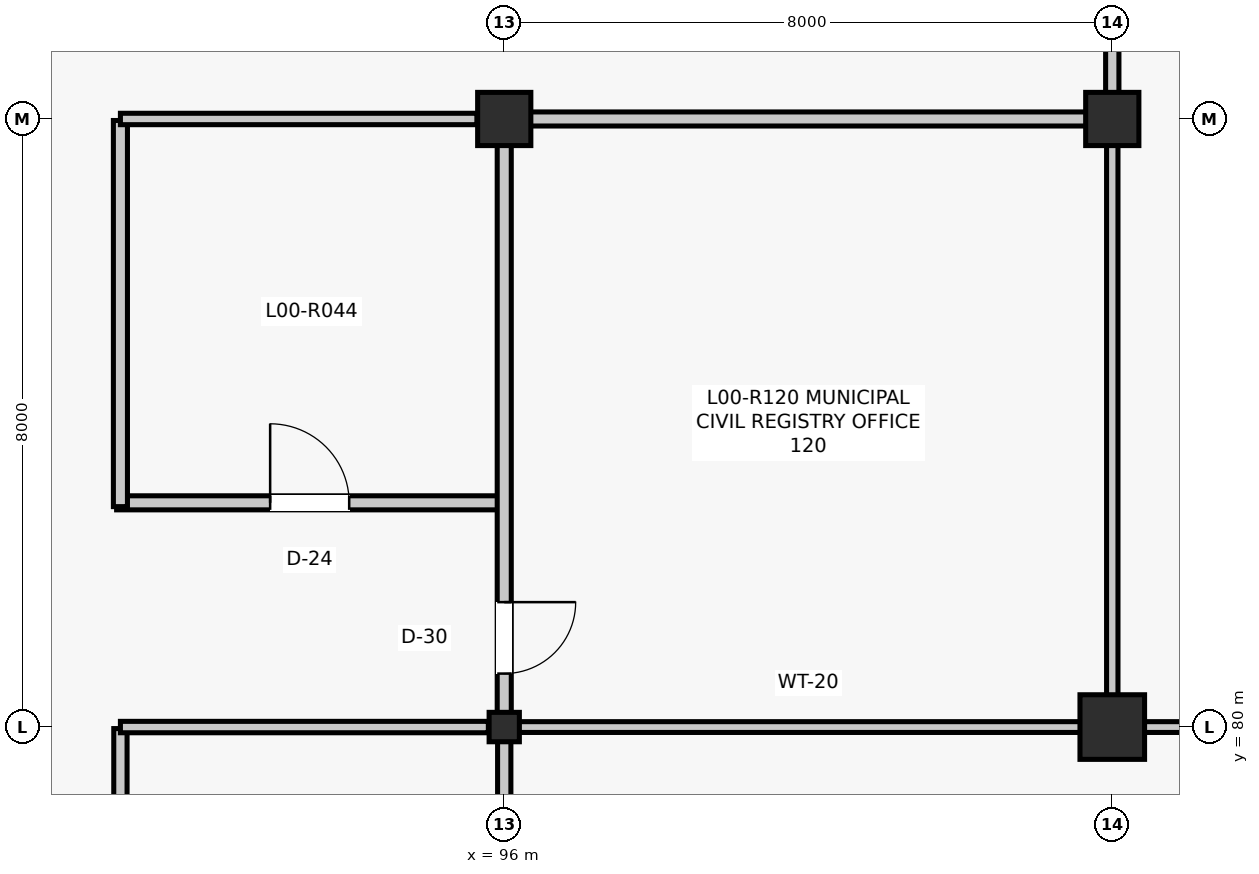
"""IFC4 building model, lengths in metres.
Left out: names, types, materials, properties, quantities, classifications, styles, units other than length and angle.
Written with IfcOpenShell. Run it as: python <this file> out.ifc"""

import sys

from ifc_helpers import new_model, si_unit, direction, frame, frame_2d, origin, origin_2d, place, context, subcontext, project, spatial, rectangle, i_section, extrude, element, fill, save


model = new_model("IFC4")
c1 = context("Model", 3, precision=1e-05, world=origin(), true_north=direction((0.0, 1.0)))
c2 = subcontext(c1, "Body", "Model", "MODEL_VIEW")
j1 = project(units=[si_unit("LENGTHUNIT", "METRE"), si_unit("PLANEANGLEUNIT", "RADIAN")], contexts=[c1])
p1 = place(None, origin())
s1 = spatial("IfcSite", under=j1, at=p1, CompositionType="ELEMENT")
p2 = place(p1, origin())
s2 = spatial("IfcBuilding", under=s1, at=p2, CompositionType="ELEMENT")
p3 = place(p2, origin())
s3 = spatial("IfcBuildingStorey", under=s2, at=p3, CompositionType="ELEMENT", Elevation=0.0)
p4 = place(p3, frame((96.0, 80.0, 0.0), z_axis=(0.0, 0.0, 1.0), x_axis=(1.0, 0.0, 0.0)))
e1 = element("IfcColumn", 1, at=p4, inside=s3, PredefinedType="COLUMN", context=c2, shape_type="SweptSolid", body=[
    extrude(i_section(OverallWidth=0.398, OverallDepth=0.387, WebThickness=0.021, FlangeThickness=0.033, FilletRadius=0.015, at=origin_2d()), origin(), (0.0, 0.0, 1.0), 5.28),
])
p5 = place(p3, frame((96.0, 88.0, 0.0), z_axis=(0.0, 0.0, 1.0), x_axis=(1.0, 0.0, 0.0)))
e2 = element("IfcColumn", 2, at=p5, inside=s3, PredefinedType="COLUMN", context=c2, shape_type="SweptSolid", body=[
    extrude(rectangle(XDim=0.7, YDim=0.7, at=origin_2d()), origin(), (0.0, 0.0, 1.0), 5.28),
])
p6 = place(p3, frame((104.0, 80.0, 0.0), z_axis=(0.0, 0.0, 1.0), x_axis=(1.0, 0.0, 0.0)))
e3 = element("IfcColumn", 3, at=p6, inside=s3, PredefinedType="COLUMN", context=c2, shape_type="SweptSolid", body=[
    extrude(rectangle(XDim=0.85, YDim=0.85, at=origin_2d()), origin(), (0.0, 0.0, 1.0), 5.28),
])
p7 = place(p3, frame((104.0, 88.0, 0.0), z_axis=(0.0, 0.0, 1.0), x_axis=(1.0, 0.0, 0.0)))
e4 = element("IfcColumn", 4, at=p7, inside=s3, PredefinedType="COLUMN", context=c2, shape_type="SweptSolid", body=[
    extrude(rectangle(XDim=0.7, YDim=0.7, at=origin_2d()), origin(), (0.0, 0.0, 1.0), 5.28),
])
p8 = place(p3, frame((90.95, 74.9, 0.0), z_axis=(0.0, 0.0, 1.0), x_axis=(0.0, 1.0, 0.0)))
e5 = element("IfcWall", 5, at=p8, inside=s3, PredefinedType="PARTITIONING", context=c2, shape_type="SweptSolid", body=[
    extrude(rectangle(XDim=5.08, YDim=0.175, at=frame_2d((2.54, 0.0))), origin(), (0.0, 0.0, 1.0), 4.403),
])
p9 = place(p3, frame((90.95, 80.0, 0.0), z_axis=(0.0, 0.0, 1.0), x_axis=(1.0, 0.0, 0.0)))
e6 = element("IfcWall", 6, at=p9, inside=s3, PredefinedType="PARTITIONING", context=c2, shape_type="SweptSolid", body=[
    extrude(rectangle(XDim=4.841, YDim=0.15, at=frame_2d((2.42, 0.0))), origin(), (0.0, 0.0, 1.0), 4.403),
])
p10 = place(p3, frame((90.9, 82.95, 0.0), z_axis=(0.0, 0.0, 1.0), x_axis=(1.0, 0.0, 0.0)))
e7 = element("IfcWall", 7, at=p10, inside=s3, PredefinedType="PARTITIONING", context=c2, shape_type="SweptSolid", body=[
    extrude(rectangle(XDim=5.08, YDim=0.185, at=frame_2d((2.54, 0.0))), origin(), (0.0, 0.0, 1.0), 4.404),
])
p11 = place(p10, frame((2.02, 0.0, 0.0)))
e8 = element("IfcOpeningElement", 8, at=p11, cuts=e7, PredefinedType="OPENING", context=c2, shape_type="SweptSolid", body=[
    extrude(rectangle(XDim=1.04, YDim=2.18, at=frame_2d((0.52, 1.09))), frame((0.0, 0.103, 0.0), z_axis=(0.0, -1.0, 0.0), x_axis=(1.0, 0.0, 0.0)), (0.0, 0.0, 1.0), 0.205),
])
p12 = place(p3, frame((90.95, 82.9, 0.0), z_axis=(0.0, 0.0, 1.0), x_axis=(0.0, 1.0, 0.0)))
e9 = element("IfcWall", 9, at=p12, inside=s3, PredefinedType="PARTITIONING", context=c2, shape_type="SweptSolid", body=[
    extrude(rectangle(XDim=5.08, YDim=0.185, at=frame_2d((2.54, 0.0))), origin(), (0.0, 0.0, 1.0), 4.336),
])
p13 = place(p3, frame((90.95, 88.0, 0.0), z_axis=(0.0, 0.0, 1.0), x_axis=(1.0, 0.0, 0.0)))
e10 = element("IfcWall", 10, at=p13, inside=s3, PredefinedType="PARTITIONING", context=c2, shape_type="SweptSolid", body=[
    extrude(rectangle(XDim=4.69, YDim=0.15, at=frame_2d((2.345, 0.0))), origin(), (0.0, 0.0, 1.0), 4.336),
])
p14 = place(p3, frame((96.0, 72.184, 0.0), z_axis=(0.0, 0.0, 1.0), x_axis=(0.0, 1.0, 0.0)))
e11 = element("IfcWall", 11, at=p14, inside=s3, PredefinedType="PARTITIONING", context=c2, shape_type="SweptSolid", body=[
    extrude(rectangle(XDim=7.633, YDim=0.175, at=frame_2d((3.816, 0.0))), origin(), (0.0, 0.0, 1.0), 4.412),
])
p15 = place(p14, frame((0.52, 0.0, 0.0)))
e12 = element("IfcOpeningElement", 12, at=p15, cuts=e11, PredefinedType="OPENING", context=c2, shape_type="SweptSolid", body=[
    extrude(rectangle(XDim=0.94, YDim=2.12, at=frame_2d((0.47, 1.06))), frame((0.0, 0.097, 0.0), z_axis=(0.0, -1.0, 0.0), x_axis=(1.0, 0.0, 0.0)), (0.0, 0.0, 1.0), 0.195),
])
p16 = place(p3, frame((96.0, 80.184, 0.0), z_axis=(0.0, 0.0, 1.0), x_axis=(0.0, 1.0, 0.0)))
e13 = element("IfcWall", 13, at=p16, inside=s3, PredefinedType="PARTITIONING", context=c2, shape_type="SweptSolid", body=[
    extrude(rectangle(XDim=7.476, YDim=0.185, at=frame_2d((3.738, 0.0))), origin(), (0.0, 0.0, 1.0), 4.404),
])
p17 = place(p16, frame((0.52, 0.0, 0.0)))
e14 = element("IfcOpeningElement", 14, at=p17, cuts=e13, PredefinedType="OPENING", context=c2, shape_type="SweptSolid", body=[
    extrude(rectangle(XDim=0.94, YDim=2.12, at=frame_2d((0.47, 1.06))), frame((0.0, 0.103, 0.0), z_axis=(0.0, -1.0, 0.0), x_axis=(1.0, 0.0, 0.0)), (0.0, 0.0, 1.0), 0.205),
])
p18 = place(p3, frame((96.189, 80.0, 0.0), z_axis=(0.0, 0.0, 1.0), x_axis=(1.0, 0.0, 0.0)))
e15 = element("IfcWall", 15, at=p18, inside=s3, PredefinedType="PARTITIONING", context=c2, shape_type="SweptSolid", body=[
    extrude(rectangle(XDim=7.396, YDim=0.142, at=frame_2d((3.698, 0.0))), origin(), (0.0, 0.0, 1.0), 4.336),
])
p19 = place(p3, frame((104.0, 80.415, 0.0), z_axis=(0.0, 0.0, 1.0), x_axis=(0.0, 1.0, 0.0)))
e16 = element("IfcWall", 16, at=p19, inside=s3, PredefinedType="PARTITIONING", context=c2, shape_type="SweptSolid", body=[
    extrude(rectangle(XDim=7.245, YDim=0.15, at=frame_2d((3.623, 0.0))), origin(), (0.0, 0.0, 1.0), 4.471),
])
p20 = place(p3, frame((96.34, 88.0, 0.0), z_axis=(0.0, 0.0, 1.0), x_axis=(1.0, 0.0, 0.0)))
e17 = element("IfcWall", 17, at=p20, inside=s3, PredefinedType="PARTITIONING", context=c2, shape_type="SweptSolid", body=[
    extrude(rectangle(XDim=7.32, YDim=0.185, at=frame_2d((3.66, 0.0))), origin(), (0.0, 0.0, 1.0), 4.404),
])
p21 = place(p3, frame((104.0, 88.34, 0.0), z_axis=(0.0, 0.0, 1.0), x_axis=(0.0, 1.0, 0.0)))
e18 = element("IfcWall", 18, at=p21, inside=s3, PredefinedType="PARTITIONING", context=c2, shape_type="SweptSolid", body=[
    extrude(rectangle(XDim=7.66, YDim=0.175, at=frame_2d((3.83, 0.0))), origin(), (0.0, 0.0, 1.0), 5.025),
])
p22 = place(p21, frame((2.88, 0.0, 0.0)))
e19 = element("IfcOpeningElement", 19, at=p22, cuts=e18, PredefinedType="OPENING", context=c2, shape_type="SweptSolid", body=[
    extrude(rectangle(XDim=1.9, YDim=2.38, at=frame_2d((0.95, 1.19))), frame((0.0, 0.097, 0.0), z_axis=(0.0, -1.0, 0.0), x_axis=(1.0, 0.0, 0.0)), (0.0, 0.0, 1.0), 0.195),
])
p23 = place(p3, frame((104.415, 80.0, 0.0), z_axis=(0.0, 0.0, 1.0), x_axis=(1.0, 0.0, 0.0)))
e20 = element("IfcWall", 20, at=p23, inside=s3, PredefinedType="PARTITIONING", context=c2, shape_type="SweptSolid", body=[
    extrude(rectangle(XDim=7.245, YDim=0.142, at=frame_2d((3.623, 0.0))), origin(), (0.0, 0.0, 1.0), 4.404),
])
p24 = place(p11, origin())
e21 = element("IfcDoor", 21, at=p24, inside=s3, OperationType="SINGLE_SWING_LEFT", PredefinedType="DOOR", context=c2, shape_type="SweptSolid", body=[
    extrude(rectangle(XDim=1.04, YDim=2.18, at=frame_2d((0.52, 1.09))), frame((0.0, 0.025, 0.0), z_axis=(0.0, -1.0, 0.0), x_axis=(1.0, 0.0, 0.0)), (0.0, 0.0, 1.0), 0.05),
])
fill(e8, e21)
p25 = place(p17, frame((0.94, 0.0, 0.0), z_axis=(0.0, 0.0, 1.0), x_axis=(-1.0, 0.0, 0.0)))
e22 = element("IfcDoor", 22, at=p25, inside=s3, OperationType="SINGLE_SWING_RIGHT", PredefinedType="DOOR", context=c2, shape_type="SweptSolid", body=[
    extrude(rectangle(XDim=0.94, YDim=2.12, at=frame_2d((0.47, 1.06))), frame((0.0, 0.025, 0.0), z_axis=(0.0, -1.0, 0.0), x_axis=(1.0, 0.0, 0.0)), (0.0, 0.0, 1.0), 0.05),
])
fill(e14, e22)
save(model, sys.argv[1])
